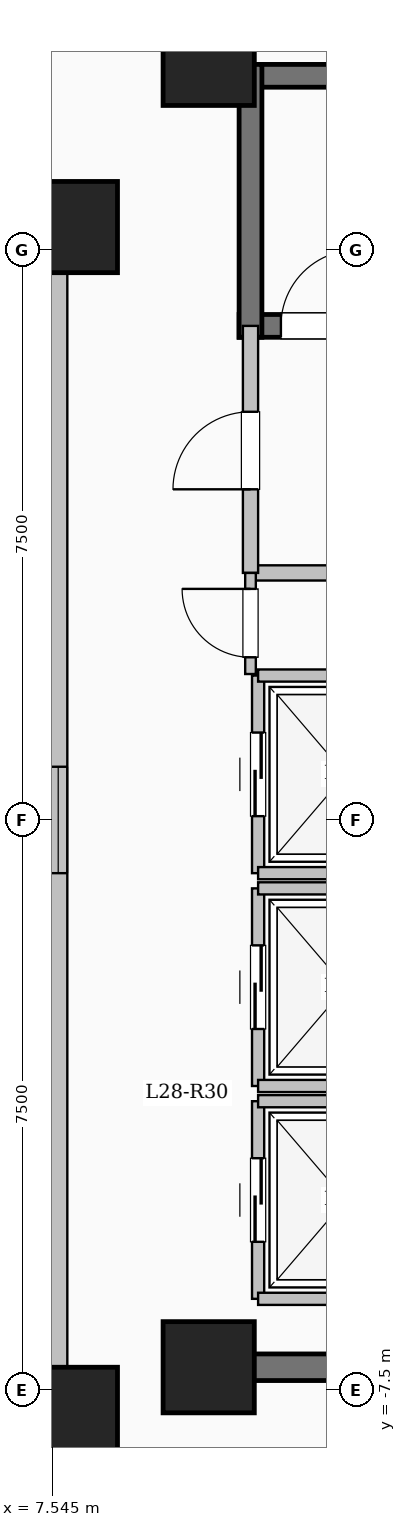
"""IFC4 building model, lengths in metres.
Left out: names, types, materials, properties, quantities, classifications, styles, units other than length and angle.
Written with IfcOpenShell. Run it as: python <this file> out.ifc"""

import sys

from ifc_helpers import new_model, si_unit, direction, frame, frame_2d, origin, origin_2d, place, context, subcontext, project, spatial, rectangle, extrude, element, fill, save


model = new_model("IFC4")
c1 = context("Model", 3, precision=1e-05, world=origin(), true_north=direction((0.0, 1.0)))
c2 = subcontext(c1, "Body", "Model", "MODEL_VIEW")
j1 = project(units=[si_unit("LENGTHUNIT", "METRE"), si_unit("PLANEANGLEUNIT", "RADIAN")], contexts=[c1])
p1 = place(None, origin())
s1 = spatial("IfcSite", under=j1, at=p1, CompositionType="ELEMENT")
p2 = place(p1, origin())
s2 = spatial("IfcBuilding", under=s1, at=p2, CompositionType="ELEMENT")
p3 = place(p2, frame((0.0, 0.0, 105.1)))
s3 = spatial("IfcBuildingStorey", under=s2, at=p3, CompositionType="ELEMENT", Elevation=105.1)
for number, where, z_axis, x_axis in (
    (1, (7.8, -7.8, 0.0), (0.0, 0.0, 1.0), (1.0, 0.0, 0.0)),
    (2, (7.8, 7.8, 0.0), (0.0, 0.0, 1.0), (1.0, 0.0, 0.0)),
    (3, (9.6, -7.2, 0.0), (0.0, 0.0, 1.0), (1.0, 0.0, 0.0)),
    (4, (9.6, 10.0, 0.0), (0.0, 0.0, 1.0), (1.0, 0.0, 0.0)),
):
    element("IfcColumn", number, at=place(p3, frame(where, z_axis=z_axis, x_axis=x_axis)), inside=s3, PredefinedType="COLUMN", context=c2, shape_type="SweptSolid", body=[
        extrude(rectangle(XDim=1.2, YDim=1.2, at=origin_2d()), origin(), (0.0, 0.0, 1.0), 3.35),
    ])
p4 = place(p3, frame((-7.62, -7.62, 0.0), z_axis=(0.0, 0.0, 1.0), x_axis=(1.0, 0.0, 0.0)))
e5 = element("IfcWall", 5, at=p4, inside=s3, PredefinedType="SOLIDWALL", context=c2, shape_type="SweptSolid", body=[
    extrude(rectangle(XDim=15.24, YDim=0.24, at=frame_2d((7.62, 0.0))), origin(), (0.0, 0.0, 1.0), 3.1),
])
p5 = place(p4, frame((6.92, 0.0, 0.95)))
e6 = element("IfcOpeningElement", 6, at=p5, cuts=e5, PredefinedType="OPENING", context=c2, shape_type="SweptSolid", body=[
    extrude(rectangle(XDim=1.4, YDim=1.5, at=frame_2d((0.7, 0.75))), frame((0.0, 0.13, 0.0), z_axis=(0.0, -1.0, 0.0), x_axis=(1.0, 0.0, 0.0)), (0.0, 0.0, 1.0), 0.26),
])
p6 = place(p3, frame((7.62, -7.62, 0.0), z_axis=(0.0, 0.0, 1.0), x_axis=(0.0, 1.0, 0.0)))
e7 = element("IfcWall", 7, at=p6, inside=s3, PredefinedType="SOLIDWALL", context=c2, shape_type="SweptSolid", body=[
    extrude(rectangle(XDim=15.24, YDim=0.24, at=frame_2d((7.62, 0.0))), origin(), (0.0, 0.0, 1.0), 3.1),
])
p7 = place(p6, frame((6.92, 0.0, 0.95)))
e8 = element("IfcOpeningElement", 8, at=p7, cuts=e7, PredefinedType="OPENING", context=c2, shape_type="SweptSolid", body=[
    extrude(rectangle(XDim=1.4, YDim=1.5, at=frame_2d((0.7, 0.75))), frame((0.0, 0.13, 0.0), z_axis=(0.0, -1.0, 0.0), x_axis=(1.0, 0.0, 0.0)), (0.0, 0.0, 1.0), 0.26),
])
p8 = place(p3, frame((7.62, 7.62, 0.0), z_axis=(0.0, 0.0, 1.0), x_axis=(-1.0, 0.0, 0.0)))
e9 = element("IfcWall", 9, at=p8, inside=s3, PredefinedType="SOLIDWALL", context=c2, shape_type="SweptSolid", body=[
    extrude(rectangle(XDim=15.24, YDim=0.24, at=frame_2d((7.62, 0.0))), origin(), (0.0, 0.0, 1.0), 3.1),
])
p9 = place(p8, frame((6.92, 0.0, 0.95)))
e10 = element("IfcOpeningElement", 10, at=p9, cuts=e9, PredefinedType="OPENING", context=c2, shape_type="SweptSolid", body=[
    extrude(rectangle(XDim=1.4, YDim=1.5, at=frame_2d((0.7, 0.75))), frame((0.0, 0.13, 0.0), z_axis=(0.0, -1.0, 0.0), x_axis=(1.0, 0.0, 0.0)), (0.0, 0.0, 1.0), 0.26),
])
p10 = place(p3, frame((10.0, 9.79, 0.0), z_axis=(0.0, 0.0, 1.0), x_axis=(1.0, 0.0, 0.0)))
e11 = element("IfcWall", 11, at=p10, inside=s3, PredefinedType="SHEAR", context=c2, shape_type="SweptSolid", body=[
    extrude(rectangle(XDim=8.0, YDim=0.3, at=frame_2d((4.0, 0.0))), origin(), (0.0, 0.0, 1.0), 3.35),
])
p11 = place(p3, frame((10.0, 6.5, 0.0), z_axis=(0.0, 0.0, 1.0), x_axis=(1.0, 0.0, 0.0)))
e12 = element("IfcWall", 12, at=p11, inside=s3, PredefinedType="SHEAR", context=c2, shape_type="SweptSolid", body=[
    extrude(rectangle(XDim=8.0, YDim=0.3, at=frame_2d((4.0, 0.0))), origin(), (0.0, 0.0, 1.0), 3.35),
])
p12 = place(p11, frame((0.55, 0.0, 0.0)))
e13 = element("IfcOpeningElement", 13, at=p12, cuts=e12, PredefinedType="OPENING", context=c2, shape_type="SweptSolid", body=[
    extrude(rectangle(XDim=1.0, YDim=2.15, at=frame_2d((0.5, 1.075))), frame((0.0, 0.16, 0.0), z_axis=(0.0, -1.0, 0.0), x_axis=(1.0, 0.0, 0.0)), (0.0, 0.0, 1.0), 0.32),
])
p13 = place(p3, frame((10.15, 6.35, 0.0), z_axis=(0.0, 0.0, 1.0), x_axis=(0.0, 1.0, 0.0)))
e14 = element("IfcWall", 14, at=p13, inside=s3, PredefinedType="SHEAR", context=c2, shape_type="SweptSolid", body=[
    extrude(rectangle(XDim=3.59, YDim=0.3, at=frame_2d((1.795, 0.0))), origin(), (0.0, 0.0, 1.0), 3.35),
])
p14 = place(p3, frame((10.15, 3.25, 0.0), z_axis=(0.0, 0.0, 1.0), x_axis=(1.0, 0.0, 0.0)))
e15 = element("IfcWall", 15, at=p14, inside=s3, PredefinedType="SOLIDWALL", context=c2, shape_type="SweptSolid", body=[
    extrude(rectangle(XDim=5.4, YDim=0.2, at=frame_2d((2.7, 0.0))), origin(), (0.0, 0.0, 1.0), 3.1),
])
p15 = place(p3, frame((10.15, 3.25, 0.0), z_axis=(0.0, 0.0, 1.0), x_axis=(0.0, 1.0, 0.0)))
e16 = element("IfcWall", 16, at=p15, inside=s3, PredefinedType="SOLIDWALL", context=c2, shape_type="SweptSolid", body=[
    extrude(rectangle(XDim=3.25, YDim=0.2, at=frame_2d((1.625, 0.0))), origin(), (0.0, 0.0, 1.0), 3.1),
])
p16 = place(p15, frame((1.1, 0.0, 0.0)))
e17 = element("IfcOpeningElement", 17, at=p16, cuts=e16, PredefinedType="OPENING", context=c2, shape_type="SweptSolid", body=[
    extrude(rectangle(XDim=1.02, YDim=2.15, at=frame_2d((0.51, 1.075))), frame((0.0, 0.11, 0.0), z_axis=(0.0, -1.0, 0.0), x_axis=(1.0, 0.0, 0.0)), (0.0, 0.0, 1.0), 0.22),
])
p17 = place(p3, frame((10.25, -6.3, 0.0), z_axis=(0.0, 0.0, 1.0), x_axis=(0.0, 1.0, 0.0)))
e18 = element("IfcWall", 18, at=p17, inside=s3, PredefinedType="SOLIDWALL", context=c2, shape_type="SweptSolid", body=[
    extrude(rectangle(XDim=2.6, YDim=0.16, at=frame_2d((1.3, 0.0))), origin(), (0.0, 0.0, 1.0), 3.1),
])
p18 = place(p17, frame((0.75, 0.0, 0.0)))
e19 = element("IfcOpeningElement", 19, at=p18, cuts=e18, PredefinedType="OPENING", context=c2, shape_type="SweptSolid", body=[
    extrude(rectangle(XDim=1.1, YDim=2.15, at=frame_2d((0.55, 1.075))), frame((0.0, 0.09, 0.0), z_axis=(0.0, -1.0, 0.0), x_axis=(1.0, 0.0, 0.0)), (0.0, 0.0, 1.0), 0.18),
])
for number, where, z_axis, x_axis in (
    (20, (10.25, -6.3, 0.0), (0.0, 0.0, 1.0), (1.0, 0.0, 0.0)),
    (21, (10.25, -3.7, 0.0), (0.0, 0.0, 1.0), (1.0, 0.0, 0.0)),
):
    element("IfcWall", number, at=place(p3, frame(where, z_axis=z_axis, x_axis=x_axis)), inside=s3, PredefinedType="SOLIDWALL", context=c2, shape_type="SweptSolid", body=[
        extrude(rectangle(XDim=2.3, YDim=0.16, at=frame_2d((1.15, 0.0))), origin(), (0.0, 0.0, 1.0), 3.1),
    ])
p19 = place(p3, frame((10.25, -3.5, 0.0), z_axis=(0.0, 0.0, 1.0), x_axis=(0.0, 1.0, 0.0)))
e22 = element("IfcWall", 22, at=p19, inside=s3, PredefinedType="SOLIDWALL", context=c2, shape_type="SweptSolid", body=[
    extrude(rectangle(XDim=2.6, YDim=0.16, at=frame_2d((1.3, 0.0))), origin(), (0.0, 0.0, 1.0), 3.1),
])
p20 = place(p19, frame((0.75, 0.0, 0.0)))
e23 = element("IfcOpeningElement", 23, at=p20, cuts=e22, PredefinedType="OPENING", context=c2, shape_type="SweptSolid", body=[
    extrude(rectangle(XDim=1.1, YDim=2.15, at=frame_2d((0.55, 1.075))), frame((0.0, 0.09, 0.0), z_axis=(0.0, -1.0, 0.0), x_axis=(1.0, 0.0, 0.0)), (0.0, 0.0, 1.0), 0.18),
])
for number, where, z_axis, x_axis in (
    (24, (10.25, -3.5, 0.0), (0.0, 0.0, 1.0), (1.0, 0.0, 0.0)),
    (25, (10.25, -0.9, 0.0), (0.0, 0.0, 1.0), (1.0, 0.0, 0.0)),
):
    element("IfcWall", number, at=place(p3, frame(where, z_axis=z_axis, x_axis=x_axis)), inside=s3, PredefinedType="SOLIDWALL", context=c2, shape_type="SweptSolid", body=[
        extrude(rectangle(XDim=2.3, YDim=0.16, at=frame_2d((1.15, 0.0))), origin(), (0.0, 0.0, 1.0), 3.1),
    ])
p21 = place(p3, frame((10.25, -0.7, 0.0), z_axis=(0.0, 0.0, 1.0), x_axis=(0.0, 1.0, 0.0)))
e26 = element("IfcWall", 26, at=p21, inside=s3, PredefinedType="SOLIDWALL", context=c2, shape_type="SweptSolid", body=[
    extrude(rectangle(XDim=2.6, YDim=0.16, at=frame_2d((1.3, 0.0))), origin(), (0.0, 0.0, 1.0), 3.1),
])
p22 = place(p21, frame((0.75, 0.0, 0.0)))
e27 = element("IfcOpeningElement", 27, at=p22, cuts=e26, PredefinedType="OPENING", context=c2, shape_type="SweptSolid", body=[
    extrude(rectangle(XDim=1.1, YDim=2.15, at=frame_2d((0.55, 1.075))), frame((0.0, 0.09, 0.0), z_axis=(0.0, -1.0, 0.0), x_axis=(1.0, 0.0, 0.0)), (0.0, 0.0, 1.0), 0.18),
])
for number, where, z_axis, x_axis in (
    (28, (10.25, -0.7, 0.0), (0.0, 0.0, 1.0), (1.0, 0.0, 0.0)),
    (29, (10.25, 1.9, 0.0), (0.0, 0.0, 1.0), (1.0, 0.0, 0.0)),
):
    element("IfcWall", number, at=place(p3, frame(where, z_axis=z_axis, x_axis=x_axis)), inside=s3, PredefinedType="SOLIDWALL", context=c2, shape_type="SweptSolid", body=[
        extrude(rectangle(XDim=2.3, YDim=0.16, at=frame_2d((1.15, 0.0))), origin(), (0.0, 0.0, 1.0), 3.1),
    ])
p23 = place(p3, frame((10.075, -7.2, 0.0), z_axis=(0.0, 0.0, 1.0), x_axis=(1.0, 0.0, 0.0)))
e30 = element("IfcWall", 30, at=p23, inside=s3, PredefinedType="SHEAR", context=c2, shape_type="SweptSolid", body=[
    extrude(rectangle(XDim=8.55, YDim=0.35, at=frame_2d((4.275, 0.0))), origin(), (0.0, 0.0, 1.0), 3.35),
])
p24 = place(p3, frame((10.15, 1.92, 0.0), z_axis=(0.0, 0.0, 1.0), x_axis=(0.0, 1.0, 0.0)))
e31 = element("IfcWall", 31, at=p24, inside=s3, PredefinedType="PARTITIONING", context=c2, shape_type="SweptSolid", body=[
    extrude(rectangle(XDim=1.33, YDim=0.14, at=frame_2d((0.665, 0.0))), origin(), (0.0, 0.0, 1.0), 3.1),
])
p25 = place(p24, frame((0.22, 0.0, 0.0)))
e32 = element("IfcOpeningElement", 32, at=p25, cuts=e31, PredefinedType="OPENING", context=c2, shape_type="SweptSolid", body=[
    extrude(rectangle(XDim=0.9, YDim=2.08, at=frame_2d((0.45, 1.04))), frame((0.0, 0.08, 0.0), z_axis=(0.0, -1.0, 0.0), x_axis=(1.0, 0.0, 0.0)), (0.0, 0.0, 1.0), 0.16),
])
p26 = place(p7, origin())
e33 = element("IfcWindow", 33, at=p26, inside=s3, PartitioningType="SINGLE_PANEL", PredefinedType="WINDOW", context=c2, shape_type="SweptSolid", body=[
    extrude(rectangle(XDim=1.4, YDim=1.5, at=frame_2d((0.7, 0.75))), frame((0.0, 0.03, 0.0), z_axis=(0.0, -1.0, 0.0), x_axis=(1.0, 0.0, 0.0)), (0.0, 0.0, 1.0), 0.06),
])
fill(e8, e33)
p27 = place(p12, origin())
e34 = element("IfcDoor", 34, at=p27, inside=s3, OperationType="SINGLE_SWING_RIGHT", PredefinedType="DOOR", context=c2, shape_type="SweptSolid", body=[
    extrude(rectangle(XDim=1.0, YDim=2.15, at=frame_2d((0.5, 1.075))), frame((0.0, 0.025, 0.0), z_axis=(0.0, -1.0, 0.0), x_axis=(1.0, 0.0, 0.0)), (0.0, 0.0, 1.0), 0.05),
])
fill(e13, e34)
p28 = place(p16, origin())
e35 = element("IfcDoor", 35, at=p28, inside=s3, OperationType="SINGLE_SWING_LEFT", PredefinedType="DOOR", context=c2, shape_type="SweptSolid", body=[
    extrude(rectangle(XDim=1.02, YDim=2.15, at=frame_2d((0.51, 1.075))), frame((0.0, 0.025, 0.0), z_axis=(0.0, -1.0, 0.0), x_axis=(1.0, 0.0, 0.0)), (0.0, 0.0, 1.0), 0.05),
])
fill(e17, e35)
p29 = place(p18, origin())
e36 = element("IfcDoor", 36, at=p29, inside=s3, OperationType="SLIDING_TO_LEFT", PredefinedType="DOOR", context=c2, shape_type="SweptSolid", body=[
    extrude(rectangle(XDim=1.1, YDim=2.15, at=frame_2d((0.55, 1.075))), frame((0.0, 0.025, 0.0), z_axis=(0.0, -1.0, 0.0), x_axis=(1.0, 0.0, 0.0)), (0.0, 0.0, 1.0), 0.05),
])
fill(e19, e36)
p30 = place(p20, origin())
e37 = element("IfcDoor", 37, at=p30, inside=s3, OperationType="SLIDING_TO_LEFT", PredefinedType="DOOR", context=c2, shape_type="SweptSolid", body=[
    extrude(rectangle(XDim=1.1, YDim=2.15, at=frame_2d((0.55, 1.075))), frame((0.0, 0.025, 0.0), z_axis=(0.0, -1.0, 0.0), x_axis=(1.0, 0.0, 0.0)), (0.0, 0.0, 1.0), 0.05),
])
fill(e23, e37)
p31 = place(p22, origin())
e38 = element("IfcDoor", 38, at=p31, inside=s3, OperationType="SLIDING_TO_LEFT", PredefinedType="DOOR", context=c2, shape_type="SweptSolid", body=[
    extrude(rectangle(XDim=1.1, YDim=2.15, at=frame_2d((0.55, 1.075))), frame((0.0, 0.025, 0.0), z_axis=(0.0, -1.0, 0.0), x_axis=(1.0, 0.0, 0.0)), (0.0, 0.0, 1.0), 0.05),
])
fill(e27, e38)
p32 = place(p25, origin())
e39 = element("IfcDoor", 39, at=p32, inside=s3, OperationType="SINGLE_SWING_RIGHT", PredefinedType="DOOR", context=c2, shape_type="SweptSolid", body=[
    extrude(rectangle(XDim=0.9, YDim=2.08, at=frame_2d((0.45, 1.04))), frame((0.0, 0.025, 0.0), z_axis=(0.0, -1.0, 0.0), x_axis=(1.0, 0.0, 0.0)), (0.0, 0.0, 1.0), 0.05),
])
fill(e32, e39)
save(model, sys.argv[1])
